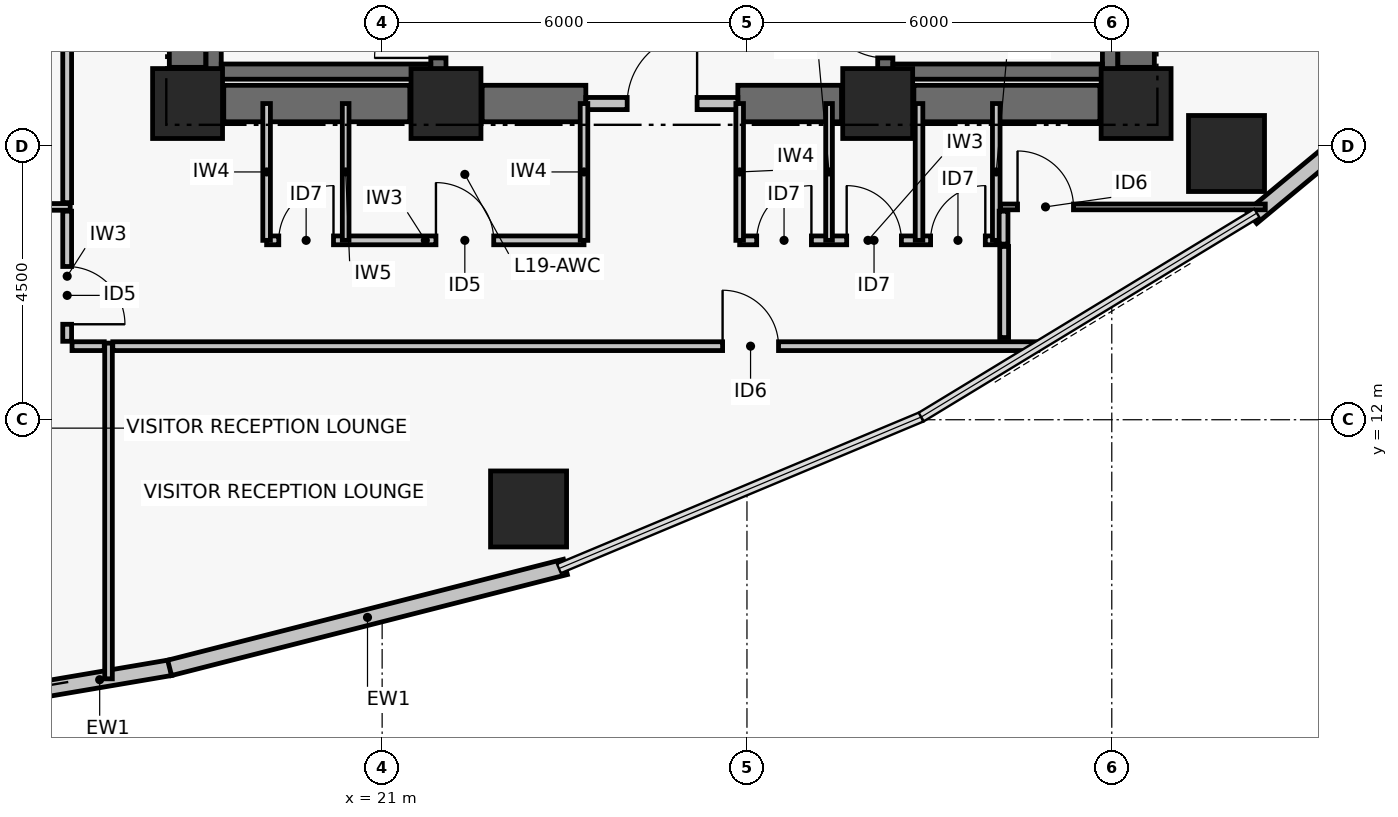
"""IFC4 building model, lengths in metres.
Left out: names, types, materials, properties, quantities, classifications, styles, units other than length and angle.
Written with IfcOpenShell. Run it as: python <this file> out.ifc"""

import sys

from ifc_helpers import new_model, si_unit, direction, frame, frame_2d, origin, origin_2d, place, context, subcontext, project, spatial, rectangle, hollow_rectangle, extrude, element, fill, save


model = new_model("IFC4")
c1 = context("Model", 3, precision=1e-05, world=origin(), true_north=direction((0.0, 1.0)))
c2 = subcontext(c1, "Body", "Model", "MODEL_VIEW")
j1 = project(units=[si_unit("LENGTHUNIT", "METRE"), si_unit("PLANEANGLEUNIT", "RADIAN")], contexts=[c1])
p1 = place(None, origin())
s1 = spatial("IfcSite", under=j1, at=p1, CompositionType="ELEMENT")
p2 = place(p1, origin())
s2 = spatial("IfcBuilding", under=s1, at=p2, CompositionType="ELEMENT")
p3 = place(p2, frame((0.0, 0.0, 79.68)))
s3 = spatial("IfcBuildingStorey", under=s2, at=p3, CompositionType="ELEMENT", Elevation=79.68)
for number, where, z_axis, x_axis in (
    (1, (17.8, 17.2, 0.0), (0.0, 0.0, 1.0), (1.0, 0.0, 0.0)),
    (2, (22.05, 17.2, 0.0), (0.0, 0.0, 1.0), (1.0, 0.0, 0.0)),
    (3, (29.15, 17.2, 0.0), (0.0, 0.0, 1.0), (1.0, 0.0, 0.0)),
    (4, (33.4, 17.2, 0.0), (0.0, 0.0, 1.0), (1.0, 0.0, 0.0)),
):
    element("IfcColumn", number, at=place(p3, frame(where, z_axis=z_axis, x_axis=x_axis)), inside=s3, PredefinedType="COLUMN", context=c2, shape_type="SweptSolid", body=[
        extrude(rectangle(XDim=1.15, YDim=1.15, at=origin_2d()), origin(), (0.0, 0.0, 1.0), 3.72),
    ])
p4 = place(p3, frame((18.395, 17.2, 0.0), z_axis=(0.0, 0.0, 1.0), x_axis=(1.0, 0.0, 0.0)))
e5 = element("IfcWall", 5, at=p4, inside=s3, PredefinedType="SHEAR", context=c2, shape_type="SweptSolid", body=[
    extrude(rectangle(XDim=3.06, YDim=0.6, at=frame_2d((1.53, 0.0))), origin(), (0.0, 0.0, 1.0), 3.38),
])
p5 = place(p3, frame((22.645, 17.2, 0.0), z_axis=(0.0, 0.0, 1.0), x_axis=(1.0, 0.0, 0.0)))
e6 = element("IfcWall", 6, at=p5, inside=s3, PredefinedType="SHEAR", context=c2, shape_type="SweptSolid", body=[
    extrude(rectangle(XDim=1.705, YDim=0.6, at=frame_2d((0.853, 0.0))), origin(), (0.0, 0.0, 1.0), 3.38),
])
p6 = place(p3, frame((26.85, 17.2, 0.0), z_axis=(0.0, 0.0, 1.0), x_axis=(1.0, 0.0, 0.0)))
e7 = element("IfcWall", 7, at=p6, inside=s3, PredefinedType="SHEAR", context=c2, shape_type="SweptSolid", body=[
    extrude(rectangle(XDim=1.705, YDim=0.6, at=frame_2d((0.853, 0.0))), origin(), (0.0, 0.0, 1.0), 3.38),
])
p7 = place(p3, frame((29.745, 17.2, 0.0), z_axis=(0.0, 0.0, 1.0), x_axis=(1.0, 0.0, 0.0)))
e8 = element("IfcWall", 8, at=p7, inside=s3, PredefinedType="SHEAR", context=c2, shape_type="SweptSolid", body=[
    extrude(rectangle(XDim=3.06, YDim=0.6, at=frame_2d((1.53, 0.0))), origin(), (0.0, 0.0, 1.0), 3.38),
])
for number, where, z_axis, x_axis in (
    (9, (17.8, 17.795, 0.0), (0.0, 0.0, 1.0), (0.0, 1.0, 0.0)),
    (10, (33.4, 17.795, 0.0), (0.0, 0.0, 1.0), (0.0, 1.0, 0.0)),
):
    element("IfcWall", number, at=place(p3, frame(where, z_axis=z_axis, x_axis=x_axis)), inside=s3, PredefinedType="SHEAR", context=c2, shape_type="SweptSolid", body=[
        extrude(rectangle(XDim=8.41, YDim=0.6, at=frame_2d((4.205, 0.0))), origin(), (0.0, 0.0, 1.0), 3.38),
    ])
p8 = place(p3, frame((18.229, 17.6, 0.0), z_axis=(0.0, 0.0, 1.0), x_axis=(0.0, 1.0, 0.0)))
e11 = element("IfcWall", 11, at=p8, inside=s3, PredefinedType="SHEAR", context=c2, shape_type="SweptSolid", body=[
    extrude(rectangle(XDim=8.8, YDim=0.25, at=frame_2d((4.4, 0.0))), origin(), (0.0, 0.0, 1.0), 3.38),
])
p9 = place(p3, frame((21.925, 17.6, 0.0), z_axis=(0.0, 0.0, 1.0), x_axis=(0.0, 1.0, 0.0)))
e12 = element("IfcWall", 12, at=p9, inside=s3, PredefinedType="SHEAR", context=c2, shape_type="SweptSolid", body=[
    extrude(rectangle(XDim=8.8, YDim=0.25, at=frame_2d((4.4, 0.0))), origin(), (0.0, 0.0, 1.0), 3.38),
])
p10 = place(p9, frame((0.35, 0.0, 0.0)))
e13 = element("IfcOpeningElement", 13, at=p10, cuts=e12, PredefinedType="OPENING", context=c2, shape_type="SweptSolid", body=[
    extrude(rectangle(XDim=1.05, YDim=2.08, at=frame_2d((0.525, 1.04))), frame((0.0, 0.135, 0.0), z_axis=(0.0, -1.0, 0.0), x_axis=(1.0, 0.0, 0.0)), (0.0, 0.0, 1.0), 0.27),
])
p11 = place(p3, frame((18.354, 17.725, 0.0), z_axis=(0.0, 0.0, 1.0), x_axis=(1.0, 0.0, 0.0)))
e14 = element("IfcWall", 14, at=p11, inside=s3, PredefinedType="SHEAR", context=c2, shape_type="SweptSolid", body=[
    extrude(rectangle(XDim=3.446, YDim=0.25, at=frame_2d((1.723, 0.0))), origin(), (0.0, 0.0, 1.0), 3.38),
])
p12 = place(p3, frame((29.275, 17.6, 0.0), z_axis=(0.0, 0.0, 1.0), x_axis=(0.0, 1.0, 0.0)))
e15 = element("IfcWall", 15, at=p12, inside=s3, PredefinedType="SHEAR", context=c2, shape_type="SweptSolid", body=[
    extrude(rectangle(XDim=8.8, YDim=0.25, at=frame_2d((4.4, 0.0))), origin(), (0.0, 0.0, 1.0), 3.38),
])
p13 = place(p12, frame((0.35, 0.0, 0.0)))
e16 = element("IfcOpeningElement", 16, at=p13, cuts=e15, PredefinedType="OPENING", context=c2, shape_type="SweptSolid", body=[
    extrude(rectangle(XDim=1.05, YDim=2.08, at=frame_2d((0.525, 1.04))), frame((0.0, 0.135, 0.0), z_axis=(0.0, -1.0, 0.0), x_axis=(1.0, 0.0, 0.0)), (0.0, 0.0, 1.0), 0.27),
])
p14 = place(p3, frame((32.971, 17.6, 0.0), z_axis=(0.0, 0.0, 1.0), x_axis=(0.0, 1.0, 0.0)))
e17 = element("IfcWall", 17, at=p14, inside=s3, PredefinedType="SHEAR", context=c2, shape_type="SweptSolid", body=[
    extrude(rectangle(XDim=8.8, YDim=0.25, at=frame_2d((4.4, 0.0))), origin(), (0.0, 0.0, 1.0), 3.38),
])
p15 = place(p3, frame((29.4, 17.725, 0.0), z_axis=(0.0, 0.0, 1.0), x_axis=(1.0, 0.0, 0.0)))
e18 = element("IfcWall", 18, at=p15, inside=s3, PredefinedType="SHEAR", context=c2, shape_type="SweptSolid", body=[
    extrude(rectangle(XDim=3.446, YDim=0.25, at=frame_2d((1.723, 0.0))), origin(), (0.0, 0.0, 1.0), 3.38),
])
for number, where, z_axis, x_axis in (
    (19, (23.408, 10.533, 0.0), (0.0, 0.0, 1.0), (1.0, 0.0, 0.0)),
    (20, (34.887, 16.378, 0.0), (0.0, 0.0, 1.0), (1.0, 0.0, 0.0)),
):
    element("IfcColumn", number, at=place(p3, frame(where, z_axis=z_axis, x_axis=x_axis)), inside=s3, PredefinedType="COLUMN", context=c2, shape_type="SweptSolid", body=[
        extrude(hollow_rectangle(XDim=1.25, YDim=1.25, WallThickness=0.05, at=origin_2d()), origin(), (0.0, 0.0, 1.0), 3.72),
    ])
p16 = place(p3, frame((17.516, 7.922, 0.0), z_axis=(0.0, 0.0, 1.0), x_axis=(-0.985905269947, -0.167304508875, 0.0)))
e21 = element("IfcWall", 21, at=p16, inside=s3, PredefinedType="PARTITIONING", context=c2, shape_type="SweptSolid", body=[
    extrude(rectangle(XDim=2.357, YDim=0.26, at=frame_2d((1.178, 0.0))), origin(), (0.0, 0.0, 1.0), 3.38),
])
p17 = place(p3, frame((24.014, 9.58, 0.0), z_axis=(0.0, 0.0, 1.0), x_axis=(-0.968981437296, -0.247133514876, 0.0)))
e22 = element("IfcWall", 22, at=p17, inside=s3, PredefinedType="PARTITIONING", context=c2, shape_type="SweptSolid", body=[
    extrude(rectangle(XDim=6.718, YDim=0.26, at=frame_2d((3.359, 0.0))), origin(), (0.0, 0.0, 1.0), 3.38),
])
p18 = place(p3, frame((40.472, 19.616, 0.0), z_axis=(0.0, 0.0, 1.0), x_axis=(-0.76975316947, -0.638341646841, 0.0)))
e23 = element("IfcWall", 23, at=p18, inside=s3, PredefinedType="PARTITIONING", context=c2, shape_type="SweptSolid", body=[
    extrude(rectangle(XDim=6.718, YDim=0.26, at=frame_2d((3.359, 0.0))), origin(), (0.0, 0.0, 1.0), 3.38),
])
p19 = place(p3, frame((24.35, 17.2, 0.0), z_axis=(0.0, 0.0, 1.0), x_axis=(1.0, 0.0, 0.0)))
e24 = element("IfcWall", 24, at=p19, inside=s3, PredefinedType="PARTITIONING", context=c2, shape_type="SweptSolid", body=[
    extrude(rectangle(XDim=2.5, YDim=0.2, at=frame_2d((1.25, 0.0))), origin(), (0.0, 0.0, 1.0), 2.51),
])
p20 = place(p19, frame((0.68, 0.0, 0.0)))
e25 = element("IfcOpeningElement", 25, at=p20, cuts=e24, PredefinedType="OPENING", context=c2, shape_type="SweptSolid", body=[
    extrude(rectangle(XDim=1.15, YDim=2.08, at=frame_2d((0.575, 1.04))), frame((0.0, 0.11, 0.0), z_axis=(0.0, -1.0, 0.0), x_axis=(1.0, 0.0, 0.0)), (0.0, 0.0, 1.0), 0.22),
])
p21 = place(p3, frame((19.1, 14.95, 0.0), z_axis=(0.0, 0.0, 1.0), x_axis=(1.0, 0.0, 0.0)))
e26 = element("IfcWall", 26, at=p21, inside=s3, PredefinedType="PARTITIONING", context=c2, shape_type="SweptSolid", body=[
    extrude(rectangle(XDim=5.22, YDim=0.145, at=frame_2d((2.61, 0.0))), origin(), (0.0, 0.0, 1.0), 2.51),
])
p22 = place(p21, frame((0.2, 0.0, 0.0)))
e27 = element("IfcOpeningElement", 27, at=p22, cuts=e26, PredefinedType="OPENING", context=c2, shape_type="SweptSolid", body=[
    extrude(rectangle(XDim=0.9, YDim=2.02, at=frame_2d((0.45, 1.01))), frame((0.0, 0.083, 0.0), z_axis=(0.0, -1.0, 0.0), x_axis=(1.0, 0.0, 0.0)), (0.0, 0.0, 1.0), 0.165),
])
p23 = place(p21, frame((2.785, 0.0, 0.0)))
e28 = element("IfcOpeningElement", 28, at=p23, cuts=e26, PredefinedType="OPENING", context=c2, shape_type="SweptSolid", body=[
    extrude(rectangle(XDim=0.95, YDim=2.06, at=frame_2d((0.475, 1.03))), frame((0.0, 0.083, 0.0), z_axis=(0.0, -1.0, 0.0), x_axis=(1.0, 0.0, 0.0)), (0.0, 0.0, 1.0), 0.165),
])
p24 = place(p3, frame((26.88, 14.95, 0.0), z_axis=(0.0, 0.0, 1.0), x_axis=(1.0, 0.0, 0.0)))
e29 = element("IfcWall", 29, at=p24, inside=s3, PredefinedType="PARTITIONING", context=c2, shape_type="SweptSolid", body=[
    extrude(rectangle(XDim=4.22, YDim=0.145, at=frame_2d((2.11, 0.0))), origin(), (0.0, 0.0, 1.0), 2.91),
])
p25 = place(p24, frame((0.28, 0.0, 0.0)))
e30 = element("IfcOpeningElement", 30, at=p25, cuts=e29, PredefinedType="OPENING", context=c2, shape_type="SweptSolid", body=[
    extrude(rectangle(XDim=0.9, YDim=2.02, at=frame_2d((0.45, 1.01))), frame((0.0, 0.083, 0.0), z_axis=(0.0, -1.0, 0.0), x_axis=(1.0, 0.0, 0.0)), (0.0, 0.0, 1.0), 0.165),
])
p26 = place(p24, frame((1.76, 0.0, 0.0)))
e31 = element("IfcOpeningElement", 31, at=p26, cuts=e29, PredefinedType="OPENING", context=c2, shape_type="SweptSolid", body=[
    extrude(rectangle(XDim=0.9, YDim=2.02, at=frame_2d((0.45, 1.01))), frame((0.0, 0.083, 0.0), z_axis=(0.0, -1.0, 0.0), x_axis=(1.0, 0.0, 0.0)), (0.0, 0.0, 1.0), 0.165),
])
p27 = place(p24, frame((3.14, 0.0, 0.0)))
e32 = element("IfcOpeningElement", 32, at=p27, cuts=e29, PredefinedType="OPENING", context=c2, shape_type="SweptSolid", body=[
    extrude(rectangle(XDim=0.9, YDim=2.02, at=frame_2d((0.45, 1.01))), frame((0.0, 0.083, 0.0), z_axis=(0.0, -1.0, 0.0), x_axis=(1.0, 0.0, 0.0)), (0.0, 0.0, 1.0), 0.165),
])
p28 = place(p3, frame((19.1, 14.95, 0.0), z_axis=(0.0, 0.0, 1.0), x_axis=(0.0, 1.0, 0.0)))
e33 = element("IfcWall", 33, at=p28, inside=s3, PredefinedType="PARTITIONING", context=c2, shape_type="SweptSolid", body=[
    extrude(rectangle(XDim=2.25, YDim=0.125, at=frame_2d((1.125, 0.0))), origin(), (0.0, 0.0, 1.0), 2.51),
])
p29 = place(p3, frame((20.4, 14.95, 0.0), z_axis=(0.0, 0.0, 1.0), x_axis=(0.0, 1.0, 0.0)))
e34 = element("IfcWall", 34, at=p29, inside=s3, PredefinedType="PARTITIONING", context=c2, shape_type="SweptSolid", body=[
    extrude(rectangle(XDim=2.25, YDim=0.11, at=frame_2d((1.125, 0.0))), origin(), (0.0, 0.0, 1.0), 2.51),
])
for number, where, z_axis, x_axis in (
    (35, (24.32, 14.95, 0.0), (0.0, 0.0, 1.0), (0.0, 1.0, 0.0)),
    (36, (26.88, 14.95, 0.0), (0.0, 0.0, 1.0), (0.0, 1.0, 0.0)),
):
    element("IfcWall", number, at=place(p3, frame(where, z_axis=z_axis, x_axis=x_axis)), inside=s3, PredefinedType="PARTITIONING", context=c2, shape_type="SweptSolid", body=[
        extrude(rectangle(XDim=2.25, YDim=0.125, at=frame_2d((1.125, 0.0))), origin(), (0.0, 0.0, 1.0), 2.51),
    ])
p30 = place(p3, frame((28.35, 14.95, 0.0), z_axis=(0.0, 0.0, 1.0), x_axis=(0.0, 1.0, 0.0)))
e37 = element("IfcWall", 37, at=p30, inside=s3, PredefinedType="PARTITIONING", context=c2, shape_type="SweptSolid", body=[
    extrude(rectangle(XDim=2.25, YDim=0.11, at=frame_2d((1.125, 0.0))), origin(), (0.0, 0.0, 1.0), 2.51),
])
for number, where, z_axis, x_axis in (
    (38, (29.83, 14.95, 0.0), (0.0, 0.0, 1.0), (0.0, 1.0, 0.0)),
    (39, (31.1, 14.95, 0.0), (0.0, 0.0, 1.0), (0.0, 1.0, 0.0)),
):
    element("IfcWall", number, at=place(p3, frame(where, z_axis=z_axis, x_axis=x_axis)), inside=s3, PredefinedType="PARTITIONING", context=c2, shape_type="SweptSolid", body=[
        extrude(rectangle(XDim=2.25, YDim=0.125, at=frame_2d((1.125, 0.0))), origin(), (0.0, 0.0, 1.0), 2.51),
    ])
p31 = place(p3, frame((15.82, 21.93, 0.0), z_axis=(0.0, 0.0, 1.0), x_axis=(0.0, -1.0, 0.0)))
e40 = element("IfcWall", 40, at=p31, inside=s3, PredefinedType="PARTITIONING", context=c2, shape_type="SweptSolid", body=[
    extrude(rectangle(XDim=6.36, YDim=0.145, at=frame_2d((3.18, 0.0))), origin(), (0.0, 0.0, 1.0), 2.51),
])
p32 = place(p31, frame((0.28, 0.0, 0.0)))
e41 = element("IfcOpeningElement", 41, at=p32, cuts=e40, PredefinedType="OPENING", context=c2, shape_type="SweptSolid", body=[
    extrude(rectangle(XDim=0.95, YDim=2.06, at=frame_2d((0.475, 1.03))), frame((0.0, 0.083, 0.0), z_axis=(0.0, -1.0, 0.0), x_axis=(1.0, 0.0, 0.0)), (0.0, 0.0, 1.0), 0.165),
])
p33 = place(p3, frame((15.82, 15.43, 0.0), z_axis=(0.0, 0.0, 1.0), x_axis=(0.0, -1.0, 0.0)))
e42 = element("IfcWall", 42, at=p33, inside=s3, PredefinedType="PARTITIONING", context=c2, shape_type="SweptSolid", body=[
    extrude(rectangle(XDim=2.14, YDim=0.145, at=frame_2d((1.07, 0.0))), origin(), (0.0, 0.0, 1.0), 2.91),
])
p34 = place(p33, frame((0.91, 0.0, 0.0)))
e43 = element("IfcOpeningElement", 43, at=p34, cuts=e42, PredefinedType="OPENING", context=c2, shape_type="SweptSolid", body=[
    extrude(rectangle(XDim=0.95, YDim=2.06, at=frame_2d((0.475, 1.03))), frame((0.0, 0.083, 0.0), z_axis=(0.0, -1.0, 0.0), x_axis=(1.0, 0.0, 0.0)), (0.0, 0.0, 1.0), 0.165),
])
p35 = place(p3, frame((15.9, 13.21, 0.0), z_axis=(0.0, 0.0, 1.0), x_axis=(1.0, 0.0, 0.0)))
e44 = element("IfcWall", 44, at=p35, inside=s3, PredefinedType="PARTITIONING", context=c2, shape_type="SweptSolid", body=[
    extrude(rectangle(XDim=0.53, YDim=0.145, at=frame_2d((0.265, 0.0))), origin(), (0.0, 0.0, 1.0), 2.51),
])
p36 = place(p3, frame((16.57, 13.21, 0.0), z_axis=(0.0, 0.0, 1.0), x_axis=(1.0, 0.0, 0.0)))
e45 = element("IfcWall", 45, at=p36, inside=s3, PredefinedType="PARTITIONING", context=c2, shape_type="SweptSolid", body=[
    extrude(rectangle(XDim=15.214, YDim=0.145, at=frame_2d((7.607, 0.0))), origin(), (0.0, 0.0, 1.0), 2.51),
])
p37 = place(p36, frame((10.029, 0.0, 0.0)))
e46 = element("IfcOpeningElement", 46, at=p37, cuts=e45, PredefinedType="OPENING", context=c2, shape_type="SweptSolid", body=[
    extrude(rectangle(XDim=0.92, YDim=2.05, at=frame_2d((0.46, 1.025))), frame((0.0, 0.083, 0.0), z_axis=(0.0, -1.0, 0.0), x_axis=(1.0, 0.0, 0.0)), (0.0, 0.0, 1.0), 0.165),
])
p38 = place(p3, frame((31.23, 13.351, 0.0), z_axis=(0.0, 0.0, 1.0), x_axis=(0.0, 1.0, 0.0)))
e47 = element("IfcWall", 47, at=p38, inside=s3, PredefinedType="PARTITIONING", context=c2, shape_type="SweptSolid", body=[
    extrude(rectangle(XDim=1.499, YDim=0.145, at=frame_2d((0.75, 0.0))), origin(), (0.0, 0.0, 1.0), 2.76),
])
p39 = place(p3, frame((31.22, 14.889, 0.0), z_axis=(0.0, 0.0, 1.0), x_axis=(0.0, 1.0, 0.0)))
e48 = element("IfcWall", 48, at=p39, inside=s3, PredefinedType="PARTITIONING", context=c2, shape_type="SweptSolid", body=[
    extrude(rectangle(XDim=0.541, YDim=0.145, at=frame_2d((0.271, 0.0))), origin(), (0.0, 0.0, 1.0), 2.91),
])
p40 = place(p3, frame((16.5, 7.739, 0.0), z_axis=(0.0, 0.0, 1.0), x_axis=(0.0, 1.0, 0.0)))
e49 = element("IfcWall", 49, at=p40, inside=s3, PredefinedType="PARTITIONING", context=c2, shape_type="SweptSolid", body=[
    extrude(rectangle(XDim=5.521, YDim=0.125, at=frame_2d((2.76, 0.0))), origin(), (0.0, 0.0, 1.0), 2.51),
])
p41 = place(p3, frame((11.644, 15.5, 0.0), z_axis=(0.0, 0.0, 1.0), x_axis=(1.0, 0.0, 0.0)))
e50 = element("IfcWall", 50, at=p41, inside=s3, PredefinedType="PARTITIONING", context=c2, shape_type="SweptSolid", body=[
    extrude(rectangle(XDim=4.227, YDim=0.11, at=frame_2d((2.113, 0.0))), origin(), (0.0, 0.0, 1.0), 2.76),
])
p42 = place(p3, frame((31.17, 15.5, 0.0), z_axis=(0.0, 0.0, 1.0), x_axis=(1.0, 0.0, 0.0)))
e51 = element("IfcWall", 51, at=p42, inside=s3, PredefinedType="PARTITIONING", context=c2, shape_type="SweptSolid", body=[
    extrude(rectangle(XDim=4.354, YDim=0.095, at=frame_2d((2.177, 0.0))), origin(), (0.0, 0.0, 1.0), 2.76),
])
p43 = place(p42, frame((0.28, 0.0, 0.0)))
e52 = element("IfcOpeningElement", 52, at=p43, cuts=e51, PredefinedType="OPENING", context=c2, shape_type="SweptSolid", body=[
    extrude(rectangle(XDim=0.92, YDim=2.05, at=frame_2d((0.46, 1.025))), frame((0.0, 0.057, 0.0), z_axis=(0.0, -1.0, 0.0), x_axis=(1.0, 0.0, 0.0)), (0.0, 0.0, 1.0), 0.115),
])
p44 = place(p10, origin())
e53 = element("IfcDoor", 53, at=p44, inside=s3, OperationType="SINGLE_SWING_LEFT", PredefinedType="DOOR", context=c2, shape_type="SweptSolid", body=[
    extrude(rectangle(XDim=1.05, YDim=2.08, at=frame_2d((0.525, 1.04))), frame((0.0, 0.025, 0.0), z_axis=(0.0, -1.0, 0.0), x_axis=(1.0, 0.0, 0.0)), (0.0, 0.0, 1.0), 0.05),
])
fill(e13, e53)
p45 = place(p13, origin())
e54 = element("IfcDoor", 54, at=p45, inside=s3, OperationType="SINGLE_SWING_RIGHT", PredefinedType="DOOR", context=c2, shape_type="SweptSolid", body=[
    extrude(rectangle(XDim=1.05, YDim=2.08, at=frame_2d((0.525, 1.04))), frame((0.0, 0.025, 0.0), z_axis=(0.0, -1.0, 0.0), x_axis=(1.0, 0.0, 0.0)), (0.0, 0.0, 1.0), 0.05),
])
fill(e16, e54)
p46 = place(p20, origin())
e55 = element("IfcDoor", 55, at=p46, inside=s3, OperationType="SINGLE_SWING_RIGHT", PredefinedType="DOOR", context=c2, shape_type="SweptSolid", body=[
    extrude(rectangle(XDim=1.15, YDim=2.08, at=frame_2d((0.575, 1.04))), frame((0.0, 0.025, 0.0), z_axis=(0.0, -1.0, 0.0), x_axis=(1.0, 0.0, 0.0)), (0.0, 0.0, 1.0), 0.05),
])
fill(e25, e55)
p47 = place(p22, origin())
e56 = element("IfcDoor", 56, at=p47, inside=s3, OperationType="SINGLE_SWING_RIGHT", PredefinedType="DOOR", context=c2, shape_type="SweptSolid", body=[
    extrude(rectangle(XDim=0.9, YDim=2.02, at=frame_2d((0.45, 1.01))), frame((0.0, 0.025, 0.0), z_axis=(0.0, -1.0, 0.0), x_axis=(1.0, 0.0, 0.0)), (0.0, 0.0, 1.0), 0.05),
])
fill(e27, e56)
p48 = place(p23, origin())
e57 = element("IfcDoor", 57, at=p48, inside=s3, OperationType="SINGLE_SWING_LEFT", PredefinedType="DOOR", context=c2, shape_type="SweptSolid", body=[
    extrude(rectangle(XDim=0.95, YDim=2.06, at=frame_2d((0.475, 1.03))), frame((0.0, 0.025, 0.0), z_axis=(0.0, -1.0, 0.0), x_axis=(1.0, 0.0, 0.0)), (0.0, 0.0, 1.0), 0.05),
])
fill(e28, e57)
p49 = place(p25, origin())
e58 = element("IfcDoor", 58, at=p49, inside=s3, OperationType="SINGLE_SWING_RIGHT", PredefinedType="DOOR", context=c2, shape_type="SweptSolid", body=[
    extrude(rectangle(XDim=0.9, YDim=2.02, at=frame_2d((0.45, 1.01))), frame((0.0, 0.025, 0.0), z_axis=(0.0, -1.0, 0.0), x_axis=(1.0, 0.0, 0.0)), (0.0, 0.0, 1.0), 0.05),
])
fill(e30, e58)
p50 = place(p26, origin())
e59 = element("IfcDoor", 59, at=p50, inside=s3, OperationType="SINGLE_SWING_LEFT", PredefinedType="DOOR", context=c2, shape_type="SweptSolid", body=[
    extrude(rectangle(XDim=0.9, YDim=2.02, at=frame_2d((0.45, 1.01))), frame((0.0, 0.025, 0.0), z_axis=(0.0, -1.0, 0.0), x_axis=(1.0, 0.0, 0.0)), (0.0, 0.0, 1.0), 0.05),
])
fill(e31, e59)
p51 = place(p27, origin())
e60 = element("IfcDoor", 60, at=p51, inside=s3, OperationType="SINGLE_SWING_RIGHT", PredefinedType="DOOR", context=c2, shape_type="SweptSolid", body=[
    extrude(rectangle(XDim=0.9, YDim=2.02, at=frame_2d((0.45, 1.01))), frame((0.0, 0.025, 0.0), z_axis=(0.0, -1.0, 0.0), x_axis=(1.0, 0.0, 0.0)), (0.0, 0.0, 1.0), 0.05),
])
fill(e32, e60)
p52 = place(p34, origin())
e61 = element("IfcDoor", 61, at=p52, inside=s3, OperationType="SINGLE_SWING_RIGHT", PredefinedType="DOOR", context=c2, shape_type="SweptSolid", body=[
    extrude(rectangle(XDim=0.95, YDim=2.06, at=frame_2d((0.475, 1.03))), frame((0.0, 0.025, 0.0), z_axis=(0.0, -1.0, 0.0), x_axis=(1.0, 0.0, 0.0)), (0.0, 0.0, 1.0), 0.05),
])
fill(e43, e61)
p53 = place(p37, origin())
e62 = element("IfcDoor", 62, at=p53, inside=s3, OperationType="SINGLE_SWING_LEFT", PredefinedType="DOOR", context=c2, shape_type="SweptSolid", body=[
    extrude(rectangle(XDim=0.92, YDim=2.05, at=frame_2d((0.46, 1.025))), frame((0.0, 0.025, 0.0), z_axis=(0.0, -1.0, 0.0), x_axis=(1.0, 0.0, 0.0)), (0.0, 0.0, 1.0), 0.05),
])
fill(e46, e62)
p54 = place(p43, origin())
e63 = element("IfcDoor", 63, at=p54, inside=s3, OperationType="SINGLE_SWING_LEFT", PredefinedType="DOOR", context=c2, shape_type="SweptSolid", body=[
    extrude(rectangle(XDim=0.92, YDim=2.05, at=frame_2d((0.46, 1.025))), frame((0.0, 0.025, 0.0), z_axis=(0.0, -1.0, 0.0), x_axis=(1.0, 0.0, 0.0)), (0.0, 0.0, 1.0), 0.05),
])
fill(e52, e63)
save(model, sys.argv[1])
